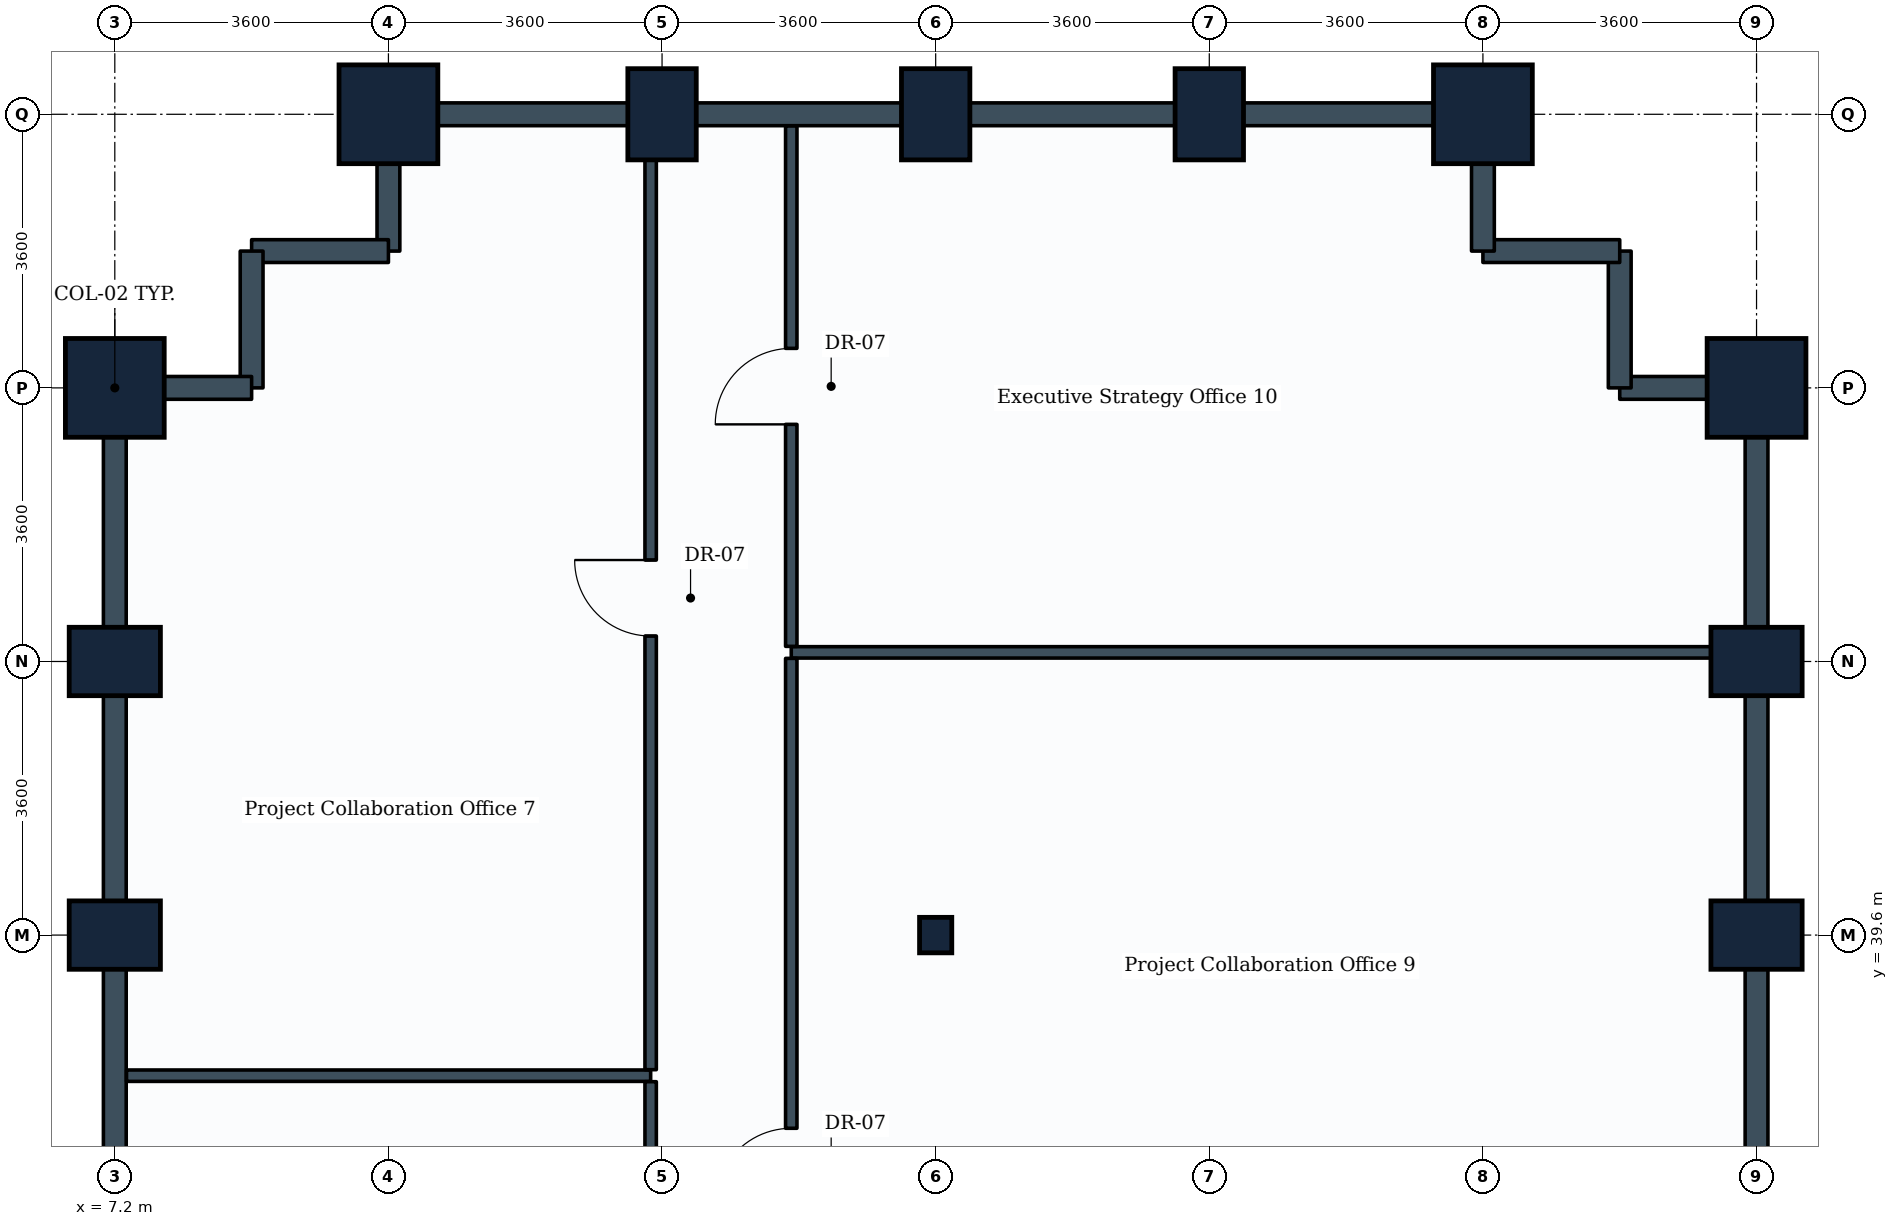
"""IFC4 building model, lengths in metres.
Left out: names, types, materials, properties, quantities, classifications, styles, units other than length and angle.
Written with IfcOpenShell. Run it as: python <this file> out.ifc"""

import sys

from ifc_helpers import new_model, si_unit, direction, frame, frame_2d, origin, origin_2d, place, context, subcontext, project, spatial, rectangle, i_section, extrude, element, fill, save


model = new_model("IFC4")
c1 = context("Model", 3, precision=1e-05, world=origin(), true_north=direction((0.0, 1.0)))
c2 = subcontext(c1, "Body", "Model", "MODEL_VIEW")
j1 = project(units=[si_unit("LENGTHUNIT", "METRE"), si_unit("PLANEANGLEUNIT", "RADIAN")], contexts=[c1])
p1 = place(None, origin())
s1 = spatial("IfcSite", under=j1, at=p1, CompositionType="ELEMENT")
p2 = place(p1, origin())
s2 = spatial("IfcBuilding", under=s1, at=p2, CompositionType="ELEMENT")
p3 = place(p2, frame((0.0, 0.0, 59.1)))
s3 = spatial("IfcBuildingStorey", under=s2, at=p3, CompositionType="ELEMENT", Elevation=59.1)
for number, where, z_axis, x_axis in (
    (1, (7.2, 39.6, 0.0), (0.0, 0.0, 1.0), (0.0, 1.0, 0.0)),
    (2, (7.2, 43.2, 0.0), (0.0, 0.0, 1.0), (0.0, 1.0, 0.0)),
):
    element("IfcColumn", number, at=place(p3, frame(where, z_axis=z_axis, x_axis=x_axis)), inside=s3, PredefinedType="COLUMN", context=c2, shape_type="SweptSolid", body=[
        extrude(rectangle(XDim=0.9, YDim=1.2, at=origin_2d()), origin(), (0.0, 0.0, 1.0), 3.9),
    ])
for number, where, z_axis, x_axis in (
    (3, (7.2, 46.8, 0.0), (0.0, 0.0, 1.0), (0.0, 1.0, 0.0)),
    (4, (10.8, 50.4, 0.0), (0.0, 0.0, 1.0), (1.0, 0.0, 0.0)),
):
    element("IfcColumn", number, at=place(p3, frame(where, z_axis=z_axis, x_axis=x_axis)), inside=s3, PredefinedType="COLUMN", context=c2, shape_type="SweptSolid", body=[
        extrude(rectangle(XDim=1.3, YDim=1.3, at=origin_2d()), origin(), (0.0, 0.0, 1.0), 3.9),
    ])
p4 = place(p3, frame((14.4, 50.4, 0.0), z_axis=(0.0, 0.0, 1.0), x_axis=(1.0, 0.0, 0.0)))
e5 = element("IfcColumn", 5, at=p4, inside=s3, PredefinedType="COLUMN", context=c2, shape_type="SweptSolid", body=[
    extrude(rectangle(XDim=0.9, YDim=1.2, at=origin_2d()), origin(), (0.0, 0.0, 1.0), 3.9),
])
p5 = place(p3, frame((18.0, 39.6, 0.0), z_axis=(0.0, 0.0, 1.0), x_axis=(1.0, 0.0, 0.0)))
e6 = element("IfcColumn", 6, at=p5, inside=s3, PredefinedType="COLUMN", context=c2, shape_type="SweptSolid", body=[
    extrude(i_section(OverallWidth=0.424, OverallDepth=0.467, WebThickness=0.033, FlangeThickness=0.053, FilletRadius=0.015, at=origin_2d()), origin(), (0.0, 0.0, 1.0), 3.9),
])
for number, where, z_axis, x_axis in (
    (7, (18.0, 50.4, 0.0), (0.0, 0.0, 1.0), (1.0, 0.0, 0.0)),
    (8, (21.6, 50.4, 0.0), (0.0, 0.0, 1.0), (1.0, 0.0, 0.0)),
):
    element("IfcColumn", number, at=place(p3, frame(where, z_axis=z_axis, x_axis=x_axis)), inside=s3, PredefinedType="COLUMN", context=c2, shape_type="SweptSolid", body=[
        extrude(rectangle(XDim=0.9, YDim=1.2, at=origin_2d()), origin(), (0.0, 0.0, 1.0), 3.9),
    ])
p6 = place(p3, frame((25.2, 50.4, 0.0), z_axis=(0.0, 0.0, 1.0), x_axis=(1.0, 0.0, 0.0)))
e9 = element("IfcColumn", 9, at=p6, inside=s3, PredefinedType="COLUMN", context=c2, shape_type="SweptSolid", body=[
    extrude(rectangle(XDim=1.3, YDim=1.3, at=origin_2d()), origin(), (0.0, 0.0, 1.0), 3.9),
])
for number, where, z_axis, x_axis in (
    (10, (28.8, 39.6, 0.0), (0.0, 0.0, 1.0), (0.0, 1.0, 0.0)),
    (11, (28.8, 43.2, 0.0), (0.0, 0.0, 1.0), (0.0, 1.0, 0.0)),
):
    element("IfcColumn", number, at=place(p3, frame(where, z_axis=z_axis, x_axis=x_axis)), inside=s3, PredefinedType="COLUMN", context=c2, shape_type="SweptSolid", body=[
        extrude(rectangle(XDim=0.9, YDim=1.2, at=origin_2d()), origin(), (0.0, 0.0, 1.0), 3.9),
    ])
p7 = place(p3, frame((28.8, 46.8, 0.0), z_axis=(0.0, 0.0, 1.0), x_axis=(0.0, 1.0, 0.0)))
e12 = element("IfcColumn", 12, at=p7, inside=s3, PredefinedType="COLUMN", context=c2, shape_type="SweptSolid", body=[
    extrude(rectangle(XDim=1.3, YDim=1.3, at=origin_2d()), origin(), (0.0, 0.0, 1.0), 3.9),
])
p8 = place(p3, frame((28.8, 36.0, 0.0), z_axis=(0.0, 0.0, 1.0), x_axis=(0.0, 1.0, 0.0)))
e13 = element("IfcWall", 13, at=p8, inside=s3, PredefinedType="STANDARD", context=c2, shape_type="SweptSolid", body=[
    extrude(rectangle(XDim=3.6, YDim=0.3, at=frame_2d((1.8, 0.0))), origin(), (0.0, 0.0, 1.0), 2.93),
])
p9 = place(p3, frame((28.8, 39.6, 0.0), z_axis=(0.0, 0.0, 1.0), x_axis=(0.0, 1.0, 0.0)))
e14 = element("IfcWall", 14, at=p9, inside=s3, PredefinedType="STANDARD", context=c2, shape_type="SweptSolid", body=[
    extrude(rectangle(XDim=3.6, YDim=0.3, at=frame_2d((1.8, 0.0))), origin(), (0.0, 0.0, 1.0), 2.93),
])
p10 = place(p3, frame((28.8, 43.2, 0.0), z_axis=(0.0, 0.0, 1.0), x_axis=(0.0, 1.0, 0.0)))
e15 = element("IfcWall", 15, at=p10, inside=s3, PredefinedType="STANDARD", context=c2, shape_type="SweptSolid", body=[
    extrude(rectangle(XDim=3.6, YDim=0.3, at=frame_2d((1.8, 0.0))), origin(), (0.0, 0.0, 1.0), 2.93),
])
p11 = place(p3, frame((27.0, 46.8, 0.0), z_axis=(0.0, 0.0, 1.0), x_axis=(1.0, 0.0, 0.0)))
e16 = element("IfcWall", 16, at=p11, inside=s3, PredefinedType="STANDARD", context=c2, shape_type="SweptSolid", body=[
    extrude(rectangle(XDim=1.8, YDim=0.3, at=frame_2d((0.9, 0.0))), origin(), (0.0, 0.0, 1.0), 2.93),
])
for number, where, z_axis, x_axis in (
    (17, (27.0, 46.8, 0.0), (0.0, 0.0, 1.0), (0.0, 1.0, 0.0)),
    (18, (25.2, 48.6, 0.0), (0.0, 0.0, 1.0), (1.0, 0.0, 0.0)),
):
    element("IfcWall", number, at=place(p3, frame(where, z_axis=z_axis, x_axis=x_axis)), inside=s3, PredefinedType="STANDARD", context=c2, shape_type="SweptSolid", body=[
        extrude(rectangle(XDim=1.8, YDim=0.3, at=frame_2d((0.9, 0.0))), origin(), (0.0, 0.0, 1.0), 3.635),
    ])
p12 = place(p3, frame((25.2, 48.6, 0.0), z_axis=(0.0, 0.0, 1.0), x_axis=(0.0, 1.0, 0.0)))
e19 = element("IfcWall", 19, at=p12, inside=s3, PredefinedType="STANDARD", context=c2, shape_type="SweptSolid", body=[
    extrude(rectangle(XDim=1.8, YDim=0.3, at=frame_2d((0.9, 0.0))), origin(), (0.0, 0.0, 1.0), 2.93),
])
p13 = place(p3, frame((21.6, 50.4, 0.0), z_axis=(0.0, 0.0, 1.0), x_axis=(1.0, 0.0, 0.0)))
e20 = element("IfcWall", 20, at=p13, inside=s3, PredefinedType="STANDARD", context=c2, shape_type="SweptSolid", body=[
    extrude(rectangle(XDim=3.6, YDim=0.3, at=frame_2d((1.8, 0.0))), origin(), (0.0, 0.0, 1.0), 2.93),
])
for number, where, z_axis, x_axis in (
    (21, (18.0, 50.4, 0.0), (0.0, 0.0, 1.0), (1.0, 0.0, 0.0)),
    (22, (14.4, 50.4, 0.0), (0.0, 0.0, 1.0), (1.0, 0.0, 0.0)),
):
    element("IfcWall", number, at=place(p3, frame(where, z_axis=z_axis, x_axis=x_axis)), inside=s3, PredefinedType="STANDARD", context=c2, shape_type="SweptSolid", body=[
        extrude(rectangle(XDim=3.6, YDim=0.3, at=frame_2d((1.8, 0.0))), origin(), (0.0, 0.0, 1.0), 2.93),
    ])
p14 = place(p3, frame((10.8, 50.4, 0.0), z_axis=(0.0, 0.0, 1.0), x_axis=(1.0, 0.0, 0.0)))
e23 = element("IfcWall", 23, at=p14, inside=s3, PredefinedType="STANDARD", context=c2, shape_type="SweptSolid", body=[
    extrude(rectangle(XDim=3.6, YDim=0.3, at=frame_2d((1.8, 0.0))), origin(), (0.0, 0.0, 1.0), 2.93),
])
p15 = place(p3, frame((10.8, 48.6, 0.0), z_axis=(0.0, 0.0, 1.0), x_axis=(0.0, 1.0, 0.0)))
e24 = element("IfcWall", 24, at=p15, inside=s3, PredefinedType="STANDARD", context=c2, shape_type="SweptSolid", body=[
    extrude(rectangle(XDim=1.8, YDim=0.3, at=frame_2d((0.9, 0.0))), origin(), (0.0, 0.0, 1.0), 2.93),
])
for number, where, z_axis, x_axis in (
    (25, (9.0, 48.6, 0.0), (0.0, 0.0, 1.0), (1.0, 0.0, 0.0)),
    (26, (9.0, 46.8, 0.0), (0.0, 0.0, 1.0), (0.0, 1.0, 0.0)),
):
    element("IfcWall", number, at=place(p3, frame(where, z_axis=z_axis, x_axis=x_axis)), inside=s3, PredefinedType="STANDARD", context=c2, shape_type="SweptSolid", body=[
        extrude(rectangle(XDim=1.8, YDim=0.3, at=frame_2d((0.9, 0.0))), origin(), (0.0, 0.0, 1.0), 3.635),
    ])
p16 = place(p3, frame((7.2, 46.8, 0.0), z_axis=(0.0, 0.0, 1.0), x_axis=(1.0, 0.0, 0.0)))
e27 = element("IfcWall", 27, at=p16, inside=s3, PredefinedType="STANDARD", context=c2, shape_type="SweptSolid", body=[
    extrude(rectangle(XDim=1.8, YDim=0.3, at=frame_2d((0.9, 0.0))), origin(), (0.0, 0.0, 1.0), 2.93),
])
p17 = place(p3, frame((7.2, 43.2, 0.0), z_axis=(0.0, 0.0, 1.0), x_axis=(0.0, 1.0, 0.0)))
e28 = element("IfcWall", 28, at=p17, inside=s3, PredefinedType="STANDARD", context=c2, shape_type="SweptSolid", body=[
    extrude(rectangle(XDim=3.6, YDim=0.3, at=frame_2d((1.8, 0.0))), origin(), (0.0, 0.0, 1.0), 2.93),
])
p18 = place(p3, frame((7.2, 39.6, 0.0), z_axis=(0.0, 0.0, 1.0), x_axis=(0.0, 1.0, 0.0)))
e29 = element("IfcWall", 29, at=p18, inside=s3, PredefinedType="STANDARD", context=c2, shape_type="SweptSolid", body=[
    extrude(rectangle(XDim=3.6, YDim=0.3, at=frame_2d((1.8, 0.0))), origin(), (0.0, 0.0, 1.0), 2.93),
])
p19 = place(p3, frame((7.2, 36.0, 0.0), z_axis=(0.0, 0.0, 1.0), x_axis=(0.0, 1.0, 0.0)))
e30 = element("IfcWall", 30, at=p19, inside=s3, PredefinedType="STANDARD", context=c2, shape_type="SweptSolid", body=[
    extrude(rectangle(XDim=3.6, YDim=0.3, at=frame_2d((1.8, 0.0))), origin(), (0.0, 0.0, 1.0), 2.93),
])
p20 = place(p3, frame((7.354, 37.75, 0.0), z_axis=(0.0, 0.0, 1.0), x_axis=(1.0, 0.0, 0.0)))
e31 = element("IfcWall", 31, at=p20, inside=s3, PredefinedType="PARTITIONING", context=c2, shape_type="SweptSolid", body=[
    extrude(rectangle(XDim=6.896, YDim=0.15, at=frame_2d((3.448, 0.0))), origin(), (0.0, 0.0, 1.0), 2.93),
])
p21 = place(p3, frame((14.25, 26.879, 0.0), z_axis=(0.0, 0.0, 1.0), x_axis=(0.0, 1.0, 0.0)))
e32 = element("IfcWall", 32, at=p21, inside=s3, PredefinedType="PARTITIONING", context=c2, shape_type="SweptSolid", body=[
    extrude(rectangle(XDim=10.792, YDim=0.15, at=frame_2d((5.396, 0.0))), origin(), (0.0, 0.0, 1.0), 3.03),
])
p22 = place(p21, frame((4.896, 0.0, 0.0)))
e33 = element("IfcOpeningElement", 33, at=p22, cuts=e32, PredefinedType="OPENING", context=c2, shape_type="SweptSolid", body=[
    extrude(rectangle(XDim=1.0, YDim=2.1, at=frame_2d((0.5, 1.05))), frame((0.0, 0.085, 0.0), z_axis=(0.0, -1.0, 0.0), x_axis=(1.0, 0.0, 0.0)), (0.0, 0.0, 1.0), 0.17),
])
p23 = place(p3, frame((14.25, 37.829, 0.0), z_axis=(0.0, 0.0, 1.0), x_axis=(0.0, 1.0, 0.0)))
e34 = element("IfcWall", 34, at=p23, inside=s3, PredefinedType="PARTITIONING", context=c2, shape_type="SweptSolid", body=[
    extrude(rectangle(XDim=12.417, YDim=0.15, at=frame_2d((6.208, 0.0))), origin(), (0.0, 0.0, 1.0), 2.93),
])
p24 = place(p23, frame((5.706, 0.0, 0.0)))
e35 = element("IfcOpeningElement", 35, at=p24, cuts=e34, PredefinedType="OPENING", context=c2, shape_type="SweptSolid", body=[
    extrude(rectangle(XDim=1.0, YDim=2.1, at=frame_2d((0.5, 1.05))), frame((0.0, 0.085, 0.0), z_axis=(0.0, -1.0, 0.0), x_axis=(1.0, 0.0, 0.0)), (0.0, 0.0, 1.0), 0.17),
])
p25 = place(p3, frame((16.1, 43.32, 0.0), z_axis=(0.0, 0.0, 1.0), x_axis=(1.0, 0.0, 0.0)))
e36 = element("IfcWall", 36, at=p25, inside=s3, PredefinedType="PARTITIONING", context=c2, shape_type="SweptSolid", body=[
    extrude(rectangle(XDim=12.546, YDim=0.15, at=frame_2d((6.273, 0.0))), origin(), (0.0, 0.0, 1.0), 2.93),
])
p26 = place(p3, frame((16.1, 35.139, 0.0), z_axis=(0.0, 0.0, 1.0), x_axis=(0.0, 1.0, 0.0)))
e37 = element("IfcWall", 37, at=p26, inside=s3, PredefinedType="PARTITIONING", context=c2, shape_type="SweptSolid", body=[
    extrude(rectangle(XDim=8.102, YDim=0.15, at=frame_2d((4.051, 0.0))), origin(), (0.0, 0.0, 1.0), 3.08),
])
p27 = place(p26, frame((0.919, 0.0, 0.0)))
e38 = element("IfcOpeningElement", 38, at=p27, cuts=e37, PredefinedType="OPENING", context=c2, shape_type="SweptSolid", body=[
    extrude(rectangle(XDim=1.0, YDim=2.1, at=frame_2d((0.5, 1.05))), frame((0.0, 0.085, 0.0), z_axis=(0.0, -1.0, 0.0), x_axis=(1.0, 0.0, 0.0)), (0.0, 0.0, 1.0), 0.17),
])
p28 = place(p3, frame((16.1, 43.399, 0.0), z_axis=(0.0, 0.0, 1.0), x_axis=(0.0, 1.0, 0.0)))
e39 = element("IfcWall", 39, at=p28, inside=s3, PredefinedType="PARTITIONING", context=c2, shape_type="SweptSolid", body=[
    extrude(rectangle(XDim=6.847, YDim=0.15, at=frame_2d((3.424, 0.0))), origin(), (0.0, 0.0, 1.0), 2.93),
])
p29 = place(p28, frame((2.921, 0.0, 0.0)))
e40 = element("IfcOpeningElement", 40, at=p29, cuts=e39, PredefinedType="OPENING", context=c2, shape_type="SweptSolid", body=[
    extrude(rectangle(XDim=1.0, YDim=2.1, at=frame_2d((0.5, 1.05))), frame((0.0, 0.085, 0.0), z_axis=(0.0, -1.0, 0.0), x_axis=(1.0, 0.0, 0.0)), (0.0, 0.0, 1.0), 0.17),
])
p30 = place(p24, origin())
e41 = element("IfcDoor", 41, at=p30, inside=s3, OperationType="SINGLE_SWING_RIGHT", PredefinedType="DOOR", context=c2, shape_type="SweptSolid", body=[
    extrude(rectangle(XDim=1.0, YDim=2.1, at=frame_2d((0.5, 1.05))), frame((0.0, 0.025, 0.0), z_axis=(0.0, -1.0, 0.0), x_axis=(1.0, 0.0, 0.0)), (0.0, 0.0, 1.0), 0.05),
])
fill(e35, e41)
p31 = place(p27, origin())
e42 = element("IfcDoor", 42, at=p31, inside=s3, OperationType="SINGLE_SWING_LEFT", PredefinedType="DOOR", context=c2, shape_type="SweptSolid", body=[
    extrude(rectangle(XDim=1.0, YDim=2.1, at=frame_2d((0.5, 1.05))), frame((0.0, 0.025, 0.0), z_axis=(0.0, -1.0, 0.0), x_axis=(1.0, 0.0, 0.0)), (0.0, 0.0, 1.0), 0.05),
])
fill(e38, e42)
p32 = place(p29, origin())
e43 = element("IfcDoor", 43, at=p32, inside=s3, OperationType="SINGLE_SWING_LEFT", PredefinedType="DOOR", context=c2, shape_type="SweptSolid", body=[
    extrude(rectangle(XDim=1.0, YDim=2.1, at=frame_2d((0.5, 1.05))), frame((0.0, 0.025, 0.0), z_axis=(0.0, -1.0, 0.0), x_axis=(1.0, 0.0, 0.0)), (0.0, 0.0, 1.0), 0.05),
])
fill(e40, e43)
save(model, sys.argv[1])
